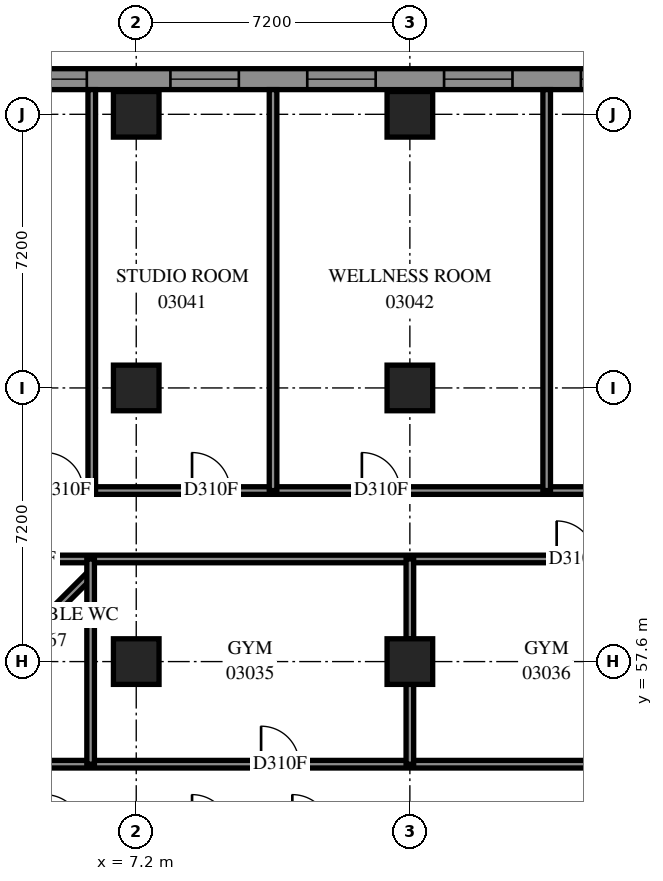
"""IFC4 building model, lengths in metres.
Left out: names, types, materials, properties, quantities, classifications, styles, units other than length and angle.
Written with IfcOpenShell. Run it as: python <this file> out.ifc"""

import sys

from ifc_helpers import new_model, si_unit, direction, frame, frame_2d, origin, origin_2d, place, context, subcontext, project, spatial, polyline, rectangle, outline, extrude, element, fill, save


model = new_model("IFC4")
c1 = context("Model", 3, precision=1e-05, world=origin(), true_north=direction((0.0, 1.0)))
c2 = subcontext(c1, "Body", "Model", "MODEL_VIEW")
j1 = project(units=[si_unit("LENGTHUNIT", "METRE"), si_unit("PLANEANGLEUNIT", "RADIAN")], contexts=[c1])
p1 = place(None, origin())
s1 = spatial("IfcSite", under=j1, at=p1, CompositionType="ELEMENT")
p2 = place(p1, origin())
s2 = spatial("IfcBuilding", under=s1, at=p2, CompositionType="ELEMENT")
p3 = place(p2, frame((0.0, 0.0, 14.4)))
s3 = spatial("IfcBuildingStorey", under=s2, at=p3, CompositionType="ELEMENT", Elevation=14.4)
for number, where, z_axis, x_axis in (
    (1, (7.2, 57.6, 0.0), (0.0, 0.0, 1.0), (1.0, 0.0, 0.0)),
    (2, (7.2, 64.8, 0.0), (0.0, 0.0, 1.0), (1.0, 0.0, 0.0)),
    (3, (7.2, 72.0, 0.0), (0.0, 0.0, 1.0), (1.0, 0.0, 0.0)),
    (4, (14.4, 57.6, 0.0), (0.0, 0.0, 1.0), (1.0, 0.0, 0.0)),
    (5, (14.4, 64.8, 0.0), (0.0, 0.0, 1.0), (1.0, 0.0, 0.0)),
    (6, (14.4, 72.0, 0.0), (0.0, 0.0, 1.0), (1.0, 0.0, 0.0)),
):
    element("IfcColumn", number, at=place(p3, frame(where, z_axis=z_axis, x_axis=x_axis)), inside=s3, PredefinedType="COLUMN", context=c2, shape_type="SweptSolid", body=[
        extrude(rectangle(XDim=1.2, YDim=1.2, at=origin_2d()), origin(), (0.0, 0.0, 1.0), 3.8),
    ])
p4 = place(p3, frame((79.583, 72.925, 0.0), z_axis=(0.0, 0.0, 1.0), x_axis=(-1.0, 0.0, 0.0)))
e7 = element("IfcWall", 7, at=p4, inside=s3, PredefinedType="SOLIDWALL", context=c2, shape_type="SweptSolid", body=[
    extrude(outline(polyline([(-0.114, -0.275), (79.583, -0.275), (79.033, 0.275), (0.114, 0.275), (-0.114, -0.275)])), origin(), (0.0, 0.0, 1.0), 3.8),
])
p5 = place(p4, frame((1.249, 0.0, 0.7)))
e8 = element("IfcOpeningElement", 8, at=p5, cuts=e7, PredefinedType="OPENING", context=c2, shape_type="SweptSolid", body=[
    extrude(rectangle(XDim=1.8, YDim=2.6, at=frame_2d((0.9, 1.3))), frame((0.0, 0.285, 0.0), z_axis=(0.0, -1.0, 0.0), x_axis=(1.0, 0.0, 0.0)), (0.0, 0.0, 1.0), 0.57),
])
p6 = place(p4, frame((4.883, 0.0, 0.7)))
e9 = element("IfcOpeningElement", 9, at=p6, cuts=e7, PredefinedType="OPENING", context=c2, shape_type="SweptSolid", body=[
    extrude(rectangle(XDim=1.8, YDim=2.6, at=frame_2d((0.9, 1.3))), frame((0.0, 0.285, 0.0), z_axis=(0.0, -1.0, 0.0), x_axis=(1.0, 0.0, 0.0)), (0.0, 0.0, 1.0), 0.57),
])
p7 = place(p4, frame((8.483, 0.0, 0.7)))
e10 = element("IfcOpeningElement", 10, at=p7, cuts=e7, PredefinedType="OPENING", context=c2, shape_type="SweptSolid", body=[
    extrude(rectangle(XDim=1.8, YDim=2.6, at=frame_2d((0.9, 1.3))), frame((0.0, 0.285, 0.0), z_axis=(0.0, -1.0, 0.0), x_axis=(1.0, 0.0, 0.0)), (0.0, 0.0, 1.0), 0.57),
])
p8 = place(p4, frame((12.083, 0.0, 0.7)))
e11 = element("IfcOpeningElement", 11, at=p8, cuts=e7, PredefinedType="OPENING", context=c2, shape_type="SweptSolid", body=[
    extrude(rectangle(XDim=1.8, YDim=2.6, at=frame_2d((0.9, 1.3))), frame((0.0, 0.285, 0.0), z_axis=(0.0, -1.0, 0.0), x_axis=(1.0, 0.0, 0.0)), (0.0, 0.0, 1.0), 0.57),
])
p9 = place(p4, frame((15.683, 0.0, 0.7)))
e12 = element("IfcOpeningElement", 12, at=p9, cuts=e7, PredefinedType="OPENING", context=c2, shape_type="SweptSolid", body=[
    extrude(rectangle(XDim=1.8, YDim=2.6, at=frame_2d((0.9, 1.3))), frame((0.0, 0.285, 0.0), z_axis=(0.0, -1.0, 0.0), x_axis=(1.0, 0.0, 0.0)), (0.0, 0.0, 1.0), 0.57),
])
p10 = place(p4, frame((19.283, 0.0, 0.7)))
e13 = element("IfcOpeningElement", 13, at=p10, cuts=e7, PredefinedType="OPENING", context=c2, shape_type="SweptSolid", body=[
    extrude(rectangle(XDim=1.8, YDim=2.6, at=frame_2d((0.9, 1.3))), frame((0.0, 0.285, 0.0), z_axis=(0.0, -1.0, 0.0), x_axis=(1.0, 0.0, 0.0)), (0.0, 0.0, 1.0), 0.57),
])
p11 = place(p4, frame((22.883, 0.0, 0.7)))
e14 = element("IfcOpeningElement", 14, at=p11, cuts=e7, PredefinedType="OPENING", context=c2, shape_type="SweptSolid", body=[
    extrude(rectangle(XDim=1.8, YDim=2.6, at=frame_2d((0.9, 1.3))), frame((0.0, 0.285, 0.0), z_axis=(0.0, -1.0, 0.0), x_axis=(1.0, 0.0, 0.0)), (0.0, 0.0, 1.0), 0.57),
])
p12 = place(p4, frame((26.483, 0.0, 0.7)))
e15 = element("IfcOpeningElement", 15, at=p12, cuts=e7, PredefinedType="OPENING", context=c2, shape_type="SweptSolid", body=[
    extrude(rectangle(XDim=1.8, YDim=2.6, at=frame_2d((0.9, 1.3))), frame((0.0, 0.285, 0.0), z_axis=(0.0, -1.0, 0.0), x_axis=(1.0, 0.0, 0.0)), (0.0, 0.0, 1.0), 0.57),
])
p13 = place(p4, frame((30.083, 0.0, 0.7)))
e16 = element("IfcOpeningElement", 16, at=p13, cuts=e7, PredefinedType="OPENING", context=c2, shape_type="SweptSolid", body=[
    extrude(rectangle(XDim=1.8, YDim=2.6, at=frame_2d((0.9, 1.3))), frame((0.0, 0.285, 0.0), z_axis=(0.0, -1.0, 0.0), x_axis=(1.0, 0.0, 0.0)), (0.0, 0.0, 1.0), 0.57),
])
p14 = place(p4, frame((33.683, 0.0, 0.7)))
e17 = element("IfcOpeningElement", 17, at=p14, cuts=e7, PredefinedType="OPENING", context=c2, shape_type="SweptSolid", body=[
    extrude(rectangle(XDim=1.8, YDim=2.6, at=frame_2d((0.9, 1.3))), frame((0.0, 0.285, 0.0), z_axis=(0.0, -1.0, 0.0), x_axis=(1.0, 0.0, 0.0)), (0.0, 0.0, 1.0), 0.57),
])
p15 = place(p4, frame((37.283, 0.0, 0.7)))
e18 = element("IfcOpeningElement", 18, at=p15, cuts=e7, PredefinedType="OPENING", context=c2, shape_type="SweptSolid", body=[
    extrude(rectangle(XDim=1.8, YDim=2.6, at=frame_2d((0.9, 1.3))), frame((0.0, 0.285, 0.0), z_axis=(0.0, -1.0, 0.0), x_axis=(1.0, 0.0, 0.0)), (0.0, 0.0, 1.0), 0.57),
])
p16 = place(p4, frame((40.883, 0.0, 0.7)))
e19 = element("IfcOpeningElement", 19, at=p16, cuts=e7, PredefinedType="OPENING", context=c2, shape_type="SweptSolid", body=[
    extrude(rectangle(XDim=1.8, YDim=2.6, at=frame_2d((0.9, 1.3))), frame((0.0, 0.285, 0.0), z_axis=(0.0, -1.0, 0.0), x_axis=(1.0, 0.0, 0.0)), (0.0, 0.0, 1.0), 0.57),
])
p17 = place(p4, frame((44.483, 0.0, 0.7)))
e20 = element("IfcOpeningElement", 20, at=p17, cuts=e7, PredefinedType="OPENING", context=c2, shape_type="SweptSolid", body=[
    extrude(rectangle(XDim=1.8, YDim=2.6, at=frame_2d((0.9, 1.3))), frame((0.0, 0.285, 0.0), z_axis=(0.0, -1.0, 0.0), x_axis=(1.0, 0.0, 0.0)), (0.0, 0.0, 1.0), 0.57),
])
p18 = place(p4, frame((48.083, 0.0, 0.7)))
e21 = element("IfcOpeningElement", 21, at=p18, cuts=e7, PredefinedType="OPENING", context=c2, shape_type="SweptSolid", body=[
    extrude(rectangle(XDim=1.8, YDim=2.6, at=frame_2d((0.9, 1.3))), frame((0.0, 0.285, 0.0), z_axis=(0.0, -1.0, 0.0), x_axis=(1.0, 0.0, 0.0)), (0.0, 0.0, 1.0), 0.57),
])
p19 = place(p4, frame((51.683, 0.0, 0.7)))
e22 = element("IfcOpeningElement", 22, at=p19, cuts=e7, PredefinedType="OPENING", context=c2, shape_type="SweptSolid", body=[
    extrude(rectangle(XDim=1.8, YDim=2.6, at=frame_2d((0.9, 1.3))), frame((0.0, 0.285, 0.0), z_axis=(0.0, -1.0, 0.0), x_axis=(1.0, 0.0, 0.0)), (0.0, 0.0, 1.0), 0.57),
])
p20 = place(p4, frame((55.283, 0.0, 0.7)))
e23 = element("IfcOpeningElement", 23, at=p20, cuts=e7, PredefinedType="OPENING", context=c2, shape_type="SweptSolid", body=[
    extrude(rectangle(XDim=1.8, YDim=2.6, at=frame_2d((0.9, 1.3))), frame((0.0, 0.285, 0.0), z_axis=(0.0, -1.0, 0.0), x_axis=(1.0, 0.0, 0.0)), (0.0, 0.0, 1.0), 0.57),
])
p21 = place(p4, frame((58.883, 0.0, 0.7)))
e24 = element("IfcOpeningElement", 24, at=p21, cuts=e7, PredefinedType="OPENING", context=c2, shape_type="SweptSolid", body=[
    extrude(rectangle(XDim=1.8, YDim=2.6, at=frame_2d((0.9, 1.3))), frame((0.0, 0.285, 0.0), z_axis=(0.0, -1.0, 0.0), x_axis=(1.0, 0.0, 0.0)), (0.0, 0.0, 1.0), 0.57),
])
p22 = place(p4, frame((62.483, 0.0, 0.7)))
e25 = element("IfcOpeningElement", 25, at=p22, cuts=e7, PredefinedType="OPENING", context=c2, shape_type="SweptSolid", body=[
    extrude(rectangle(XDim=1.8, YDim=2.6, at=frame_2d((0.9, 1.3))), frame((0.0, 0.285, 0.0), z_axis=(0.0, -1.0, 0.0), x_axis=(1.0, 0.0, 0.0)), (0.0, 0.0, 1.0), 0.57),
])
p23 = place(p4, frame((66.083, 0.0, 0.7)))
e26 = element("IfcOpeningElement", 26, at=p23, cuts=e7, PredefinedType="OPENING", context=c2, shape_type="SweptSolid", body=[
    extrude(rectangle(XDim=1.8, YDim=2.6, at=frame_2d((0.9, 1.3))), frame((0.0, 0.285, 0.0), z_axis=(0.0, -1.0, 0.0), x_axis=(1.0, 0.0, 0.0)), (0.0, 0.0, 1.0), 0.57),
])
p24 = place(p4, frame((69.683, 0.0, 0.7)))
e27 = element("IfcOpeningElement", 27, at=p24, cuts=e7, PredefinedType="OPENING", context=c2, shape_type="SweptSolid", body=[
    extrude(rectangle(XDim=1.8, YDim=2.6, at=frame_2d((0.9, 1.3))), frame((0.0, 0.285, 0.0), z_axis=(0.0, -1.0, 0.0), x_axis=(1.0, 0.0, 0.0)), (0.0, 0.0, 1.0), 0.57),
])
p25 = place(p4, frame((73.683, 0.0, 0.7)))
e28 = element("IfcOpeningElement", 28, at=p25, cuts=e7, PredefinedType="OPENING", context=c2, shape_type="SweptSolid", body=[
    extrude(rectangle(XDim=1.8, YDim=2.6, at=frame_2d((0.9, 1.3))), frame((0.0, 0.285, 0.0), z_axis=(0.0, -1.0, 0.0), x_axis=(1.0, 0.0, 0.0)), (0.0, 0.0, 1.0), 0.57),
])
p26 = place(p4, frame((76.508, 0.0, 0.7)))
e29 = element("IfcOpeningElement", 29, at=p26, cuts=e7, PredefinedType="OPENING", context=c2, shape_type="SweptSolid", body=[
    extrude(rectangle(XDim=1.8, YDim=2.6, at=frame_2d((0.9, 1.3))), frame((0.0, 0.285, 0.0), z_axis=(0.0, -1.0, 0.0), x_axis=(1.0, 0.0, 0.0)), (0.0, 0.0, 1.0), 0.57),
])
p27 = place(p3, frame((0.0, 54.9, 0.0), z_axis=(0.0, 0.0, 1.0), x_axis=(1.0, 0.0, 0.0)))
e30 = element("IfcWall", 30, at=p27, inside=s3, PredefinedType="PARTITIONING", context=c2, shape_type="SweptSolid", body=[
    extrude(rectangle(XDim=54.8, YDim=0.2, at=frame_2d((27.4, 0.0))), origin(), (0.0, 0.0, 1.0), 3.8),
])
p28 = place(p27, frame((10.485, 0.0, 0.0)))
e31 = element("IfcOpeningElement", 31, at=p28, cuts=e30, PredefinedType="OPENING", context=c2, shape_type="SweptSolid", body=[
    extrude(rectangle(XDim=1.0, YDim=2.1, at=frame_2d((0.5, 1.05))), frame((0.0, 0.11, 0.0), z_axis=(0.0, -1.0, 0.0), x_axis=(1.0, 0.0, 0.0)), (0.0, 0.0, 1.0), 0.22),
])
p29 = place(p27, frame((52.902, 0.0, 0.0)))
e32 = element("IfcOpeningElement", 32, at=p29, cuts=e30, PredefinedType="OPENING", context=c2, shape_type="SweptSolid", body=[
    extrude(rectangle(XDim=1.0, YDim=2.1, at=frame_2d((0.5, 1.05))), frame((0.0, 0.11, 0.0), z_axis=(0.0, -1.0, 0.0), x_axis=(1.0, 0.0, 0.0)), (0.0, 0.0, 1.0), 0.22),
])
p30 = place(p27, frame((2.268, 0.0, 0.0)))
e33 = element("IfcOpeningElement", 33, at=p30, cuts=e30, PredefinedType="OPENING", context=c2, shape_type="SweptSolid", body=[
    extrude(rectangle(XDim=1.0, YDim=2.1, at=frame_2d((0.5, 1.05))), frame((0.0, 0.11, 0.0), z_axis=(0.0, -1.0, 0.0), x_axis=(1.0, 0.0, 0.0)), (0.0, 0.0, 1.0), 0.22),
])
p31 = place(p3, frame((0.002, 60.3, 0.0), z_axis=(0.0, 0.0, 1.0), x_axis=(1.0, 0.0, 0.0)))
e34 = element("IfcWall", 34, at=p31, inside=s3, PredefinedType="PARTITIONING", context=c2, shape_type="SweptSolid", body=[
    extrude(rectangle(XDim=54.798, YDim=0.2, at=frame_2d((27.399, 0.0))), origin(), (0.0, 0.0, 1.0), 3.8),
])
p32 = place(p31, frame((18.261, 0.0, 0.0)))
e35 = element("IfcOpeningElement", 35, at=p32, cuts=e34, PredefinedType="OPENING", context=c2, shape_type="SweptSolid", body=[
    extrude(rectangle(XDim=1.0, YDim=2.1, at=frame_2d((0.5, 1.05))), frame((0.0, 0.11, 0.0), z_axis=(0.0, -1.0, 0.0), x_axis=(1.0, 0.0, 0.0)), (0.0, 0.0, 1.0), 0.22),
])
p33 = place(p31, frame((27.256, 0.0, 0.0)))
e36 = element("IfcOpeningElement", 36, at=p33, cuts=e34, PredefinedType="OPENING", context=c2, shape_type="SweptSolid", body=[
    extrude(rectangle(XDim=1.0, YDim=2.1, at=frame_2d((0.5, 1.05))), frame((0.0, 0.11, 0.0), z_axis=(0.0, -1.0, 0.0), x_axis=(1.0, 0.0, 0.0)), (0.0, 0.0, 1.0), 0.22),
])
p34 = place(p31, frame((36.54, 0.0, 0.0)))
e37 = element("IfcOpeningElement", 37, at=p34, cuts=e34, PredefinedType="OPENING", context=c2, shape_type="SweptSolid", body=[
    extrude(rectangle(XDim=1.0, YDim=2.1, at=frame_2d((0.5, 1.05))), frame((0.0, 0.11, 0.0), z_axis=(0.0, -1.0, 0.0), x_axis=(1.0, 0.0, 0.0)), (0.0, 0.0, 1.0), 0.22),
])
p35 = place(p31, frame((47.06, 0.0, 0.0)))
e38 = element("IfcOpeningElement", 38, at=p35, cuts=e34, PredefinedType="OPENING", context=c2, shape_type="SweptSolid", body=[
    extrude(rectangle(XDim=1.0, YDim=2.1, at=frame_2d((0.5, 1.05))), frame((0.0, 0.11, 0.0), z_axis=(0.0, -1.0, 0.0), x_axis=(1.0, 0.0, 0.0)), (0.0, 0.0, 1.0), 0.22),
])
p36 = place(p31, frame((3.898, 0.0, 0.0)))
e39 = element("IfcOpeningElement", 39, at=p36, cuts=e34, PredefinedType="OPENING", context=c2, shape_type="SweptSolid", body=[
    extrude(rectangle(XDim=1.0, YDim=2.1, at=frame_2d((0.5, 1.05))), frame((0.0, 0.11, 0.0), z_axis=(0.0, -1.0, 0.0), x_axis=(1.0, 0.0, 0.0)), (0.0, 0.0, 1.0), 0.22),
])
p37 = place(p3, frame((0.002, 62.1, 0.0), z_axis=(0.0, 0.0, 1.0), x_axis=(1.0, 0.0, 0.0)))
e40 = element("IfcWall", 40, at=p37, inside=s3, PredefinedType="PARTITIONING", context=c2, shape_type="SweptSolid", body=[
    extrude(rectangle(XDim=54.798, YDim=0.2, at=frame_2d((27.399, 0.0))), origin(), (0.0, 0.0, 1.0), 3.8),
])
p38 = place(p37, frame((8.667, 0.0, 0.0)))
e41 = element("IfcOpeningElement", 41, at=p38, cuts=e40, PredefinedType="OPENING", context=c2, shape_type="SweptSolid", body=[
    extrude(rectangle(XDim=1.0, YDim=2.1, at=frame_2d((0.5, 1.05))), frame((0.0, 0.11, 0.0), z_axis=(0.0, -1.0, 0.0), x_axis=(1.0, 0.0, 0.0)), (0.0, 0.0, 1.0), 0.22),
])
p39 = place(p37, frame((13.136, 0.0, 0.0)))
e42 = element("IfcOpeningElement", 42, at=p39, cuts=e40, PredefinedType="OPENING", context=c2, shape_type="SweptSolid", body=[
    extrude(rectangle(XDim=1.0, YDim=2.1, at=frame_2d((0.5, 1.05))), frame((0.0, 0.11, 0.0), z_axis=(0.0, -1.0, 0.0), x_axis=(1.0, 0.0, 0.0)), (0.0, 0.0, 1.0), 0.22),
])
p40 = place(p37, frame((20.335, 0.0, 0.0)))
e43 = element("IfcOpeningElement", 43, at=p40, cuts=e40, PredefinedType="OPENING", context=c2, shape_type="SweptSolid", body=[
    extrude(rectangle(XDim=1.0, YDim=2.1, at=frame_2d((0.5, 1.05))), frame((0.0, 0.11, 0.0), z_axis=(0.0, -1.0, 0.0), x_axis=(1.0, 0.0, 0.0)), (0.0, 0.0, 1.0), 0.22),
])
p41 = place(p37, frame((27.535, 0.0, 0.0)))
e44 = element("IfcOpeningElement", 44, at=p41, cuts=e40, PredefinedType="OPENING", context=c2, shape_type="SweptSolid", body=[
    extrude(rectangle(XDim=1.0, YDim=2.1, at=frame_2d((0.5, 1.05))), frame((0.0, 0.11, 0.0), z_axis=(0.0, -1.0, 0.0), x_axis=(1.0, 0.0, 0.0)), (0.0, 0.0, 1.0), 0.22),
])
p42 = place(p37, frame((34.736, 0.0, 0.0)))
e45 = element("IfcOpeningElement", 45, at=p42, cuts=e40, PredefinedType="OPENING", context=c2, shape_type="SweptSolid", body=[
    extrude(rectangle(XDim=1.0, YDim=2.1, at=frame_2d((0.5, 1.05))), frame((0.0, 0.11, 0.0), z_axis=(0.0, -1.0, 0.0), x_axis=(1.0, 0.0, 0.0)), (0.0, 0.0, 1.0), 0.22),
])
p43 = place(p37, frame((41.935, 0.0, 0.0)))
e46 = element("IfcOpeningElement", 46, at=p43, cuts=e40, PredefinedType="OPENING", context=c2, shape_type="SweptSolid", body=[
    extrude(rectangle(XDim=1.0, YDim=2.1, at=frame_2d((0.5, 1.05))), frame((0.0, 0.11, 0.0), z_axis=(0.0, -1.0, 0.0), x_axis=(1.0, 0.0, 0.0)), (0.0, 0.0, 1.0), 0.22),
])
p44 = place(p37, frame((49.136, 0.0, 0.0)))
e47 = element("IfcOpeningElement", 47, at=p44, cuts=e40, PredefinedType="OPENING", context=c2, shape_type="SweptSolid", body=[
    extrude(rectangle(XDim=1.0, YDim=2.1, at=frame_2d((0.5, 1.05))), frame((0.0, 0.11, 0.0), z_axis=(0.0, -1.0, 0.0), x_axis=(1.0, 0.0, 0.0)), (0.0, 0.0, 1.0), 0.22),
])
p45 = place(p37, frame((4.799, 0.0, 0.0)))
e48 = element("IfcOpeningElement", 48, at=p45, cuts=e40, PredefinedType="OPENING", context=c2, shape_type="SweptSolid", body=[
    extrude(rectangle(XDim=1.0, YDim=2.1, at=frame_2d((0.5, 1.05))), frame((0.0, 0.11, 0.0), z_axis=(0.0, -1.0, 0.0), x_axis=(1.0, 0.0, 0.0)), (0.0, 0.0, 1.0), 0.22),
])
for number, where, z_axis, x_axis in (
    (49, (6.03, 62.1, 0.0), (0.0, 0.0, 1.0), (0.0, 1.0, 0.0)),
    (50, (10.8, 62.1, 0.0), (0.0, 0.0, 1.0), (0.0, 1.0, 0.0)),
    (51, (18.0, 62.1, 0.0), (0.0, 0.0, 1.0), (0.0, 1.0, 0.0)),
):
    element("IfcWall", number, at=place(p3, frame(where, z_axis=z_axis, x_axis=x_axis)), inside=s3, PredefinedType="PARTITIONING", context=c2, shape_type="SweptSolid", body=[
        extrude(rectangle(XDim=10.55, YDim=0.2, at=frame_2d((5.275, 0.0))), origin(), (0.0, 0.0, 1.0), 3.8),
    ])
p46 = place(p3, frame((1.005, 54.901, 0.0), z_axis=(0.0, 0.0, 1.0), x_axis=(0.7071067812, 0.7071067812, 0.0)))
e52 = element("IfcWall", 52, at=p46, inside=s3, PredefinedType="PARTITIONING", context=c2, shape_type="SweptSolid", body=[
    extrude(rectangle(XDim=7.063, YDim=0.2, at=frame_2d((3.531, 0.0))), origin(), (0.0, 0.0, 1.0), 3.8),
])
p47 = place(p3, frame((6.0, 54.9, 0.0), z_axis=(0.0, 0.0, 1.0), x_axis=(0.0, 1.0, 0.0)))
e53 = element("IfcWall", 53, at=p47, inside=s3, PredefinedType="PARTITIONING", context=c2, shape_type="SweptSolid", body=[
    extrude(rectangle(XDim=5.4, YDim=0.2, at=frame_2d((2.7, 0.0))), origin(), (0.0, 0.0, 1.0), 3.8),
])
for number, where, z_axis, x_axis in (
    (54, (14.4, 54.9, 0.0), (0.0, 0.0, 1.0), (0.0, 1.0, 0.0)),
    (55, (14.4, 58.2, 0.0), (0.0, 0.0, 1.0), (0.0, 1.0, 0.0)),
):
    element("IfcWall", number, at=place(p3, frame(where, z_axis=z_axis, x_axis=x_axis)), inside=s3, PredefinedType="PARTITIONING", context=c2, shape_type="SweptSolid", body=[
        extrude(rectangle(XDim=2.1, YDim=0.2, at=frame_2d((1.05, 0.0))), origin(), (0.0, 0.0, 1.0), 3.8),
    ])
p48 = place(p21, origin())
e56 = element("IfcWindow", 56, at=p48, inside=s3, PartitioningType="SINGLE_PANEL", PredefinedType="WINDOW", context=c2, shape_type="SweptSolid", body=[
    extrude(rectangle(XDim=1.8, YDim=2.6, at=frame_2d((0.9, 1.3))), frame((0.0, 0.155, 0.0), z_axis=(0.0, -1.0, 0.0), x_axis=(1.0, 0.0, 0.0)), (0.0, 0.0, 1.0), 0.06),
])
fill(e24, e56)
p49 = place(p22, origin())
e57 = element("IfcWindow", 57, at=p49, inside=s3, PartitioningType="SINGLE_PANEL", PredefinedType="WINDOW", context=c2, shape_type="SweptSolid", body=[
    extrude(rectangle(XDim=1.8, YDim=2.6, at=frame_2d((0.9, 1.3))), frame((0.0, 0.155, 0.0), z_axis=(0.0, -1.0, 0.0), x_axis=(1.0, 0.0, 0.0)), (0.0, 0.0, 1.0), 0.06),
])
fill(e25, e57)
p50 = place(p23, origin())
e58 = element("IfcWindow", 58, at=p50, inside=s3, PartitioningType="SINGLE_PANEL", PredefinedType="WINDOW", context=c2, shape_type="SweptSolid", body=[
    extrude(rectangle(XDim=1.8, YDim=2.6, at=frame_2d((0.9, 1.3))), frame((0.0, 0.155, 0.0), z_axis=(0.0, -1.0, 0.0), x_axis=(1.0, 0.0, 0.0)), (0.0, 0.0, 1.0), 0.06),
])
fill(e26, e58)
p51 = place(p24, origin())
e59 = element("IfcWindow", 59, at=p51, inside=s3, PartitioningType="SINGLE_PANEL", PredefinedType="WINDOW", context=c2, shape_type="SweptSolid", body=[
    extrude(rectangle(XDim=1.8, YDim=2.6, at=frame_2d((0.9, 1.3))), frame((0.0, 0.155, 0.0), z_axis=(0.0, -1.0, 0.0), x_axis=(1.0, 0.0, 0.0)), (0.0, 0.0, 1.0), 0.06),
])
fill(e27, e59)
p52 = place(p25, origin())
e60 = element("IfcWindow", 60, at=p52, inside=s3, PartitioningType="SINGLE_PANEL", PredefinedType="WINDOW", context=c2, shape_type="SweptSolid", body=[
    extrude(rectangle(XDim=1.8, YDim=2.6, at=frame_2d((0.9, 1.3))), frame((0.0, 0.155, 0.0), z_axis=(0.0, -1.0, 0.0), x_axis=(1.0, 0.0, 0.0)), (0.0, 0.0, 1.0), 0.06),
])
fill(e28, e60)
p53 = place(p28, origin())
e61 = element("IfcDoor", 61, at=p53, inside=s3, OperationType="SINGLE_SWING_RIGHT", PredefinedType="DOOR", context=c2, shape_type="SweptSolid", body=[
    extrude(rectangle(XDim=1.0, YDim=2.1, at=frame_2d((0.5, 1.05))), frame((0.0, 0.025, 0.0), z_axis=(0.0, -1.0, 0.0), x_axis=(1.0, 0.0, 0.0)), (0.0, 0.0, 1.0), 0.05),
])
fill(e31, e61)
p54 = place(p32, origin())
e62 = element("IfcDoor", 62, at=p54, inside=s3, OperationType="SINGLE_SWING_LEFT", PredefinedType="DOOR", context=c2, shape_type="SweptSolid", body=[
    extrude(rectangle(XDim=1.0, YDim=2.1, at=frame_2d((0.5, 1.05))), frame((0.0, 0.025, 0.0), z_axis=(0.0, -1.0, 0.0), x_axis=(1.0, 0.0, 0.0)), (0.0, 0.0, 1.0), 0.05),
])
fill(e35, e62)
p55 = place(p38, origin())
e63 = element("IfcDoor", 63, at=p55, inside=s3, OperationType="SINGLE_SWING_RIGHT", PredefinedType="DOOR", context=c2, shape_type="SweptSolid", body=[
    extrude(rectangle(XDim=1.0, YDim=2.1, at=frame_2d((0.5, 1.05))), frame((0.0, 0.025, 0.0), z_axis=(0.0, -1.0, 0.0), x_axis=(1.0, 0.0, 0.0)), (0.0, 0.0, 1.0), 0.05),
])
fill(e41, e63)
p56 = place(p39, origin())
e64 = element("IfcDoor", 64, at=p56, inside=s3, OperationType="SINGLE_SWING_LEFT", PredefinedType="DOOR", context=c2, shape_type="SweptSolid", body=[
    extrude(rectangle(XDim=1.0, YDim=2.1, at=frame_2d((0.5, 1.05))), frame((0.0, 0.025, 0.0), z_axis=(0.0, -1.0, 0.0), x_axis=(1.0, 0.0, 0.0)), (0.0, 0.0, 1.0), 0.05),
])
fill(e42, e64)
p57 = place(p45, origin())
e65 = element("IfcDoor", 65, at=p57, inside=s3, OperationType="SINGLE_SWING_LEFT", PredefinedType="DOOR", context=c2, shape_type="SweptSolid", body=[
    extrude(rectangle(XDim=1.0, YDim=2.1, at=frame_2d((0.5, 1.05))), frame((0.0, 0.025, 0.0), z_axis=(0.0, -1.0, 0.0), x_axis=(1.0, 0.0, 0.0)), (0.0, 0.0, 1.0), 0.05),
])
fill(e48, e65)
save(model, sys.argv[1])
